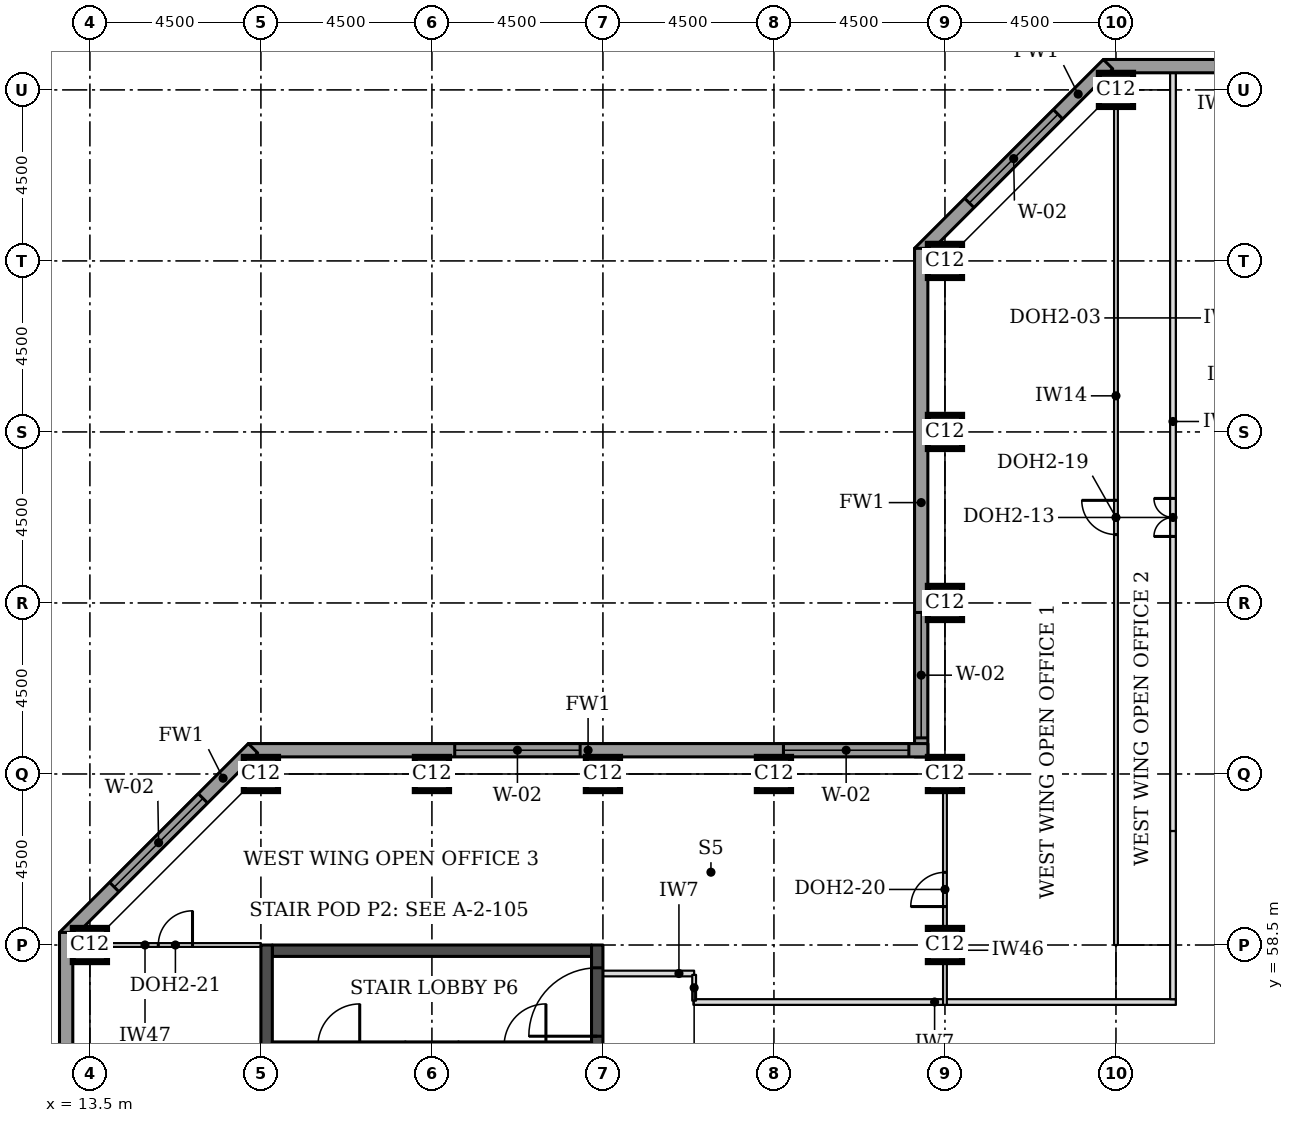
"""IFC4 building model, lengths in metres.
Left out: names, types, materials, properties, quantities, classifications, styles, units other than length and angle.
Written with IfcOpenShell. Run it as: python <this file> out.ifc"""

import sys

from ifc_helpers import new_model, si_unit, direction, frame, frame_2d, origin, origin_2d, place, context, subcontext, project, spatial, rectangle, extrude, element, fill, save


model = new_model("IFC4")
c1 = context("Model", 3, precision=1e-05, world=origin(), true_north=direction((0.0, 1.0)))
c2 = subcontext(c1, "Body", "Model", "MODEL_VIEW")
j1 = project(units=[si_unit("LENGTHUNIT", "METRE"), si_unit("PLANEANGLEUNIT", "RADIAN")], contexts=[c1])
p1 = place(None, origin())
s1 = spatial("IfcSite", under=j1, at=p1, CompositionType="ELEMENT")
p2 = place(p1, origin())
s2 = spatial("IfcBuilding", under=s1, at=p2, CompositionType="ELEMENT")
p3 = place(p2, frame((0.0, 0.0, 158.8)))
s3 = spatial("IfcBuildingStorey", under=s2, at=p3, CompositionType="ELEMENT", Elevation=158.8)
for number, where, z_axis, x_axis in (
    (1, (13.5, 58.5, 0.0), (0.0, 0.0, 1.0), (1.0, 0.0, 0.0)),
    (2, (36.0, 58.5, 0.0), (0.0, 0.0, 1.0), (1.0, 0.0, 0.0)),
    (3, (18.0, 63.0, 0.0), (0.0, 0.0, 1.0), (1.0, 0.0, 0.0)),
    (4, (22.5, 63.0, 0.0), (0.0, 0.0, 1.0), (1.0, 0.0, 0.0)),
    (5, (27.0, 63.0, 0.0), (0.0, 0.0, 1.0), (1.0, 0.0, 0.0)),
    (6, (31.5, 63.0, 0.0), (0.0, 0.0, 1.0), (1.0, 0.0, 0.0)),
    (7, (36.0, 63.0, 0.0), (0.0, 0.0, 1.0), (1.0, 0.0, 0.0)),
    (8, (36.0, 67.5, 0.0), (0.0, 0.0, 1.0), (1.0, 0.0, 0.0)),
    (9, (36.0, 72.0, 0.0), (0.0, 0.0, 1.0), (1.0, 0.0, 0.0)),
    (10, (36.0, 76.5, 0.0), (0.0, 0.0, 1.0), (1.0, 0.0, 0.0)),
    (11, (40.5, 81.0, 0.0), (0.0, 0.0, 1.0), (1.0, 0.0, 0.0)),
):
    element("IfcColumn", number, at=place(p3, frame(where, z_axis=z_axis, x_axis=x_axis)), inside=s3, PredefinedType="COLUMN", context=c2, shape_type="SweptSolid", body=[
        extrude(rectangle(XDim=0.9, YDim=0.9, at=origin_2d()), origin(), (0.0, 0.0, 1.0), 3.7),
    ])
p4 = place(p3, frame((18.3, 58.35, 0.0), z_axis=(0.0, 0.0, 1.0), x_axis=(1.0, 0.0, 0.0)))
e12 = element("IfcWall", 12, at=p4, inside=s3, PredefinedType="SHEAR", context=c2, shape_type="SweptSolid", body=[
    extrude(rectangle(XDim=8.4, YDim=0.3, at=frame_2d((4.2, 0.0))), origin(), (0.0, 0.0, 1.0), 3.7),
])
p5 = place(p3, frame((18.15, 49.5, 0.0), z_axis=(0.0, 0.0, 1.0), x_axis=(0.0, 1.0, 0.0)))
e13 = element("IfcWall", 13, at=p5, inside=s3, PredefinedType="SHEAR", context=c2, shape_type="SweptSolid", body=[
    extrude(rectangle(XDim=9.0, YDim=0.3, at=frame_2d((4.5, 0.0))), origin(), (0.0, 0.0, 1.0), 3.7),
])
p6 = place(p3, frame((26.85, 49.5, 0.0), z_axis=(0.0, 0.0, 1.0), x_axis=(0.0, 1.0, 0.0)))
e14 = element("IfcWall", 14, at=p6, inside=s3, PredefinedType="SHEAR", context=c2, shape_type="SweptSolid", body=[
    extrude(rectangle(XDim=9.0, YDim=0.3, at=frame_2d((4.5, 0.0))), origin(), (0.0, 0.0, 1.0), 3.7),
])
p7 = place(p6, frame((6.6, 0.0, 0.0)))
e15 = element("IfcOpeningElement", 15, at=p7, cuts=e14, PredefinedType="OPENING", context=c2, shape_type="SweptSolid", body=[
    extrude(rectangle(XDim=1.8, YDim=2.1, at=frame_2d((0.9, 1.05))), frame((0.0, 0.16, 0.0), z_axis=(0.0, -1.0, 0.0), x_axis=(1.0, 0.0, 0.0)), (0.0, 0.0, 1.0), 0.32),
])
p8 = place(p3, frame((72.331, 81.625, 0.0), z_axis=(0.0, 0.0, 1.0), x_axis=(-1.0, 0.0, 0.0)))
e16 = element("IfcWall", 16, at=p8, inside=s3, PredefinedType="STANDARD", context=c2, shape_type="SweptSolid", body=[
    extrude(rectangle(XDim=32.163, YDim=0.35, at=frame_2d((16.081, 0.0))), origin(), (0.0, 0.0, 1.0), 3.525),
])
p9 = place(p8, frame((5.431, 0.0, 0.9)))
e17 = element("IfcOpeningElement", 17, at=p9, cuts=e16, PredefinedType="OPENING", context=c2, shape_type="SweptSolid", body=[
    extrude(rectangle(XDim=3.3, YDim=1.9, at=frame_2d((1.65, 0.95))), frame((0.0, 0.185, 0.0), z_axis=(0.0, -1.0, 0.0), x_axis=(1.0, 0.0, 0.0)), (0.0, 0.0, 1.0), 0.37),
])
p10 = place(p8, frame((9.931, 0.0, 0.9)))
e18 = element("IfcOpeningElement", 18, at=p10, cuts=e16, PredefinedType="OPENING", context=c2, shape_type="SweptSolid", body=[
    extrude(rectangle(XDim=3.3, YDim=1.9, at=frame_2d((1.65, 0.95))), frame((0.0, 0.185, 0.0), z_axis=(0.0, -1.0, 0.0), x_axis=(1.0, 0.0, 0.0)), (0.0, 0.0, 1.0), 0.37),
])
p11 = place(p8, frame((14.431, 0.0, 0.9)))
e19 = element("IfcOpeningElement", 19, at=p11, cuts=e16, PredefinedType="OPENING", context=c2, shape_type="SweptSolid", body=[
    extrude(rectangle(XDim=3.3, YDim=1.9, at=frame_2d((1.65, 0.95))), frame((0.0, 0.185, 0.0), z_axis=(0.0, -1.0, 0.0), x_axis=(1.0, 0.0, 0.0)), (0.0, 0.0, 1.0), 0.37),
])
p12 = place(p8, frame((18.931, 0.0, 0.9)))
e20 = element("IfcOpeningElement", 20, at=p12, cuts=e16, PredefinedType="OPENING", context=c2, shape_type="SweptSolid", body=[
    extrude(rectangle(XDim=3.3, YDim=1.9, at=frame_2d((1.65, 0.95))), frame((0.0, 0.185, 0.0), z_axis=(0.0, -1.0, 0.0), x_axis=(1.0, 0.0, 0.0)), (0.0, 0.0, 1.0), 0.37),
])
p13 = place(p8, frame((23.431, 0.0, 0.9)))
e21 = element("IfcOpeningElement", 21, at=p13, cuts=e16, PredefinedType="OPENING", context=c2, shape_type="SweptSolid", body=[
    extrude(rectangle(XDim=3.3, YDim=1.9, at=frame_2d((1.65, 0.95))), frame((0.0, 0.185, 0.0), z_axis=(0.0, -1.0, 0.0), x_axis=(1.0, 0.0, 0.0)), (0.0, 0.0, 1.0), 0.37),
])
p14 = place(p3, frame((40.292, 81.676, 0.0), z_axis=(0.0, 0.0, 1.0), x_axis=(-0.707106781187, -0.707106781187, 0.0)))
e22 = element("IfcWall", 22, at=p14, inside=s3, PredefinedType="STANDARD", context=c2, shape_type="SweptSolid", body=[
    extrude(rectangle(XDim=7.027, YDim=0.35, at=frame_2d((3.513, 0.0))), origin(), (0.0, 0.0, 1.0), 3.525),
])
p15 = place(p14, frame((1.863, 0.0, 0.9)))
e23 = element("IfcOpeningElement", 23, at=p15, cuts=e22, PredefinedType="OPENING", context=c2, shape_type="SweptSolid", body=[
    extrude(rectangle(XDim=3.3, YDim=1.9, at=frame_2d((1.65, 0.95))), frame((0.0, 0.185, 0.0), z_axis=(0.0, -1.0, 0.0), x_axis=(1.0, 0.0, 0.0)), (0.0, 0.0, 1.0), 0.37),
])
p16 = place(p3, frame((35.375, 76.831, 0.0), z_axis=(0.0, 0.0, 1.0), x_axis=(0.0, -1.0, 0.0)))
e24 = element("IfcWall", 24, at=p16, inside=s3, PredefinedType="STANDARD", context=c2, shape_type="SweptSolid", body=[
    extrude(rectangle(XDim=13.381, YDim=0.35, at=frame_2d((6.691, 0.0))), origin(), (0.0, 0.0, 1.0), 3.525),
])
p17 = place(p16, frame((9.581, 0.0, 0.9)))
e25 = element("IfcOpeningElement", 25, at=p17, cuts=e24, PredefinedType="OPENING", context=c2, shape_type="SweptSolid", body=[
    extrude(rectangle(XDim=3.3, YDim=1.9, at=frame_2d((1.65, 0.95))), frame((0.0, 0.185, 0.0), z_axis=(0.0, -1.0, 0.0), x_axis=(1.0, 0.0, 0.0)), (0.0, 0.0, 1.0), 0.37),
])
p18 = place(p3, frame((35.55, 63.625, 0.0), z_axis=(0.0, 0.0, 1.0), x_axis=(-1.0, 0.0, 0.0)))
e26 = element("IfcWall", 26, at=p18, inside=s3, PredefinedType="STANDARD", context=c2, shape_type="SweptSolid", body=[
    extrude(rectangle(XDim=17.881, YDim=0.35, at=frame_2d((8.941, 0.0))), origin(), (0.0, 0.0, 1.0), 3.525),
])
p19 = place(p18, frame((0.5, 0.0, 0.9)))
e27 = element("IfcOpeningElement", 27, at=p19, cuts=e26, PredefinedType="OPENING", context=c2, shape_type="SweptSolid", body=[
    extrude(rectangle(XDim=3.3, YDim=1.9, at=frame_2d((1.65, 0.95))), frame((0.0, 0.185, 0.0), z_axis=(0.0, -1.0, 0.0), x_axis=(1.0, 0.0, 0.0)), (0.0, 0.0, 1.0), 0.37),
])
p20 = place(p18, frame((9.15, 0.0, 0.9)))
e28 = element("IfcOpeningElement", 28, at=p20, cuts=e26, PredefinedType="OPENING", context=c2, shape_type="SweptSolid", body=[
    extrude(rectangle(XDim=3.3, YDim=1.9, at=frame_2d((1.65, 0.95))), frame((0.0, 0.185, 0.0), z_axis=(0.0, -1.0, 0.0), x_axis=(1.0, 0.0, 0.0)), (0.0, 0.0, 1.0), 0.37),
])
p21 = place(p3, frame((17.792, 63.676, 0.0), z_axis=(0.0, 0.0, 1.0), x_axis=(-0.707106781187, -0.707106781187, 0.0)))
e29 = element("IfcWall", 29, at=p21, inside=s3, PredefinedType="STANDARD", context=c2, shape_type="SweptSolid", body=[
    extrude(rectangle(XDim=7.027, YDim=0.35, at=frame_2d((3.513, 0.0))), origin(), (0.0, 0.0, 1.0), 3.525),
])
p22 = place(p21, frame((1.863, 0.0, 0.9)))
e30 = element("IfcOpeningElement", 30, at=p22, cuts=e29, PredefinedType="OPENING", context=c2, shape_type="SweptSolid", body=[
    extrude(rectangle(XDim=3.3, YDim=1.9, at=frame_2d((1.65, 0.95))), frame((0.0, 0.185, 0.0), z_axis=(0.0, -1.0, 0.0), x_axis=(1.0, 0.0, 0.0)), (0.0, 0.0, 1.0), 0.37),
])
p23 = place(p3, frame((12.875, 58.831, 0.0), z_axis=(0.0, 0.0, 1.0), x_axis=(0.0, -1.0, 0.0)))
e31 = element("IfcWall", 31, at=p23, inside=s3, PredefinedType="STANDARD", context=c2, shape_type="SweptSolid", body=[
    extrude(rectangle(XDim=14.163, YDim=0.35, at=frame_2d((7.081, 0.0))), origin(), (0.0, 0.0, 1.0), 3.525),
])
p24 = place(p23, frame((5.431, 0.0, 0.9)))
e32 = element("IfcOpeningElement", 32, at=p24, cuts=e31, PredefinedType="OPENING", context=c2, shape_type="SweptSolid", body=[
    extrude(rectangle(XDim=3.3, YDim=1.9, at=frame_2d((1.65, 0.95))), frame((0.0, 0.185, 0.0), z_axis=(0.0, -1.0, 0.0), x_axis=(1.0, 0.0, 0.0)), (0.0, 0.0, 1.0), 0.37),
])
p25 = place(p3, frame((29.38, 57.0, 0.0), z_axis=(0.0, 0.0, 1.0), x_axis=(1.0, 0.0, 0.0)))
e33 = element("IfcWall", 33, at=p25, inside=s3, PredefinedType="PARTITIONING", context=c2, shape_type="SweptSolid", body=[
    extrude(rectangle(XDim=12.695, YDim=0.15, at=frame_2d((6.348, 0.0))), origin(), (0.0, 0.0, 1.0), 3.55),
])
p26 = place(p3, frame((42.0, 57.075, 0.0), z_axis=(0.0, 0.0, 1.0), x_axis=(0.0, 1.0, 0.0)))
e34 = element("IfcWall", 34, at=p26, inside=s3, PredefinedType="PARTITIONING", context=c2, shape_type="SweptSolid", body=[
    extrude(rectangle(XDim=4.425, YDim=0.15, at=frame_2d((2.212, 0.0))), origin(), (0.0, 0.0, 1.0), 3.55),
])
p27 = place(p3, frame((42.0, 61.5, 0.0), z_axis=(0.0, 0.0, 1.0), x_axis=(0.0, 1.0, 0.0)))
e35 = element("IfcWall", 35, at=p27, inside=s3, PredefinedType="PARTITIONING", context=c2, shape_type="SweptSolid", body=[
    extrude(rectangle(XDim=19.95, YDim=0.15, at=frame_2d((9.975, 0.0))), origin(), (0.0, 0.0, 1.0), 3.55),
])
p28 = place(p27, frame((7.75, 0.0, 0.0)))
e36 = element("IfcOpeningElement", 36, at=p28, cuts=e35, PredefinedType="OPENING", context=c2, shape_type="SweptSolid", body=[
    extrude(rectangle(XDim=1.0, YDim=2.1, at=frame_2d((0.5, 1.05))), frame((0.0, 0.085, 0.0), z_axis=(0.0, -1.0, 0.0), x_axis=(1.0, 0.0, 0.0)), (0.0, 0.0, 1.0), 0.17),
])
p29 = place(p3, frame((40.5, 81.0, 0.0), z_axis=(0.0, 0.0, 1.0), x_axis=(0.0, -1.0, 0.0)))
e37 = element("IfcWall", 37, at=p29, inside=s3, PredefinedType="PARTITIONING", context=c2, shape_type="SweptSolid", body=[
    extrude(rectangle(XDim=22.5, YDim=0.1, at=frame_2d((11.25, 0.0))), origin(), (0.0, 0.0, 1.0), 3.55),
])
p30 = place(p29, frame((10.8, 0.0, 0.0)))
e38 = element("IfcOpeningElement", 38, at=p30, cuts=e37, PredefinedType="OPENING", context=c2, shape_type="SweptSolid", body=[
    extrude(rectangle(XDim=0.9, YDim=2.1, at=frame_2d((0.45, 1.05))), frame((0.0, 0.06, 0.0), z_axis=(0.0, -1.0, 0.0), x_axis=(1.0, 0.0, 0.0)), (0.0, 0.0, 1.0), 0.12),
])
p31 = place(p3, frame((36.0, 63.0, 0.0), z_axis=(0.0, 0.0, 1.0), x_axis=(0.0, -1.0, 0.0)))
e39 = element("IfcWall", 39, at=p31, inside=s3, PredefinedType="PARTITIONING", context=c2, shape_type="SweptSolid", body=[
    extrude(rectangle(XDim=6.075, YDim=0.1, at=frame_2d((3.038, 0.0))), origin(), (0.0, 0.0, 1.0), 2.8),
])
p32 = place(p31, frame((2.588, 0.0, 0.0)))
e40 = element("IfcOpeningElement", 40, at=p32, cuts=e39, PredefinedType="OPENING", context=c2, shape_type="SweptSolid", body=[
    extrude(rectangle(XDim=0.9, YDim=2.1, at=frame_2d((0.45, 1.05))), frame((0.0, 0.06, 0.0), z_axis=(0.0, -1.0, 0.0), x_axis=(1.0, 0.0, 0.0)), (0.0, 0.0, 1.0), 0.12),
])
p33 = place(p3, frame((13.5, 58.5, 0.0), z_axis=(0.0, 0.0, 1.0), x_axis=(1.0, 0.0, 0.0)))
e41 = element("IfcWall", 41, at=p33, inside=s3, PredefinedType="PARTITIONING", context=c2, shape_type="SweptSolid", body=[
    extrude(rectangle(XDim=4.5, YDim=0.1, at=frame_2d((2.25, 0.0))), origin(), (0.0, 0.0, 1.0), 2.55),
])
p34 = place(p33, frame((1.8, 0.0, 0.0)))
e42 = element("IfcOpeningElement", 42, at=p34, cuts=e41, PredefinedType="OPENING", context=c2, shape_type="SweptSolid", body=[
    extrude(rectangle(XDim=0.9, YDim=2.1, at=frame_2d((0.45, 1.05))), frame((0.0, 0.06, 0.0), z_axis=(0.0, -1.0, 0.0), x_axis=(1.0, 0.0, 0.0)), (0.0, 0.0, 1.0), 0.12),
])
p35 = place(p3, frame((27.0, 57.75, 0.0), z_axis=(0.0, 0.0, 1.0), x_axis=(1.0, 0.0, 0.0)))
e43 = element("IfcWall", 43, at=p35, inside=s3, PredefinedType="PARTITIONING", context=c2, shape_type="SweptSolid", body=[
    extrude(rectangle(XDim=2.4, YDim=0.15, at=frame_2d((1.2, 0.0))), origin(), (0.0, 0.0, 1.0), 3.55),
])
p36 = place(p3, frame((29.4, 57.715, 0.0), z_axis=(0.0, 0.0, 1.0), x_axis=(0.0, -1.0, 0.0)))
e44 = element("IfcWall", 44, at=p36, inside=s3, PredefinedType="PARTITIONING", context=c2, shape_type="SweptSolid", body=[
    extrude(rectangle(XDim=0.68, YDim=0.1, at=frame_2d((0.34, 0.0))), origin(), (0.0, 0.0, 1.0), 3.55),
])
p37 = place(p3, frame((21.8, 55.85, 0.0), z_axis=(0.0, 0.0, 1.0), x_axis=(1.0, 0.0, 0.0)))
e45 = element("IfcWall", 45, at=p37, inside=s3, PredefinedType="SOLIDWALL", context=c2, shape_type="SweptSolid", body=[
    extrude(rectangle(XDim=1.4, YDim=0.2, at=frame_2d((0.7, 0.0))), origin(), (0.0, 0.0, 1.0), 3.55),
])
p38 = place(p3, frame((18.3, 55.85, 0.0), z_axis=(0.0, 0.0, 1.0), x_axis=(1.0, 0.0, 0.0)))
e46 = element("IfcWall", 46, at=p38, inside=s3, PredefinedType="SOLIDWALL", context=c2, shape_type="SweptSolid", body=[
    extrude(rectangle(XDim=3.5, YDim=0.2, at=frame_2d((1.75, 0.0))), origin(), (0.0, 0.0, 1.0), 3.55),
])
p39 = place(p38, frame((1.2, 0.0, 0.0)))
e47 = element("IfcOpeningElement", 47, at=p39, cuts=e46, PredefinedType="OPENING", context=c2, shape_type="SweptSolid", body=[
    extrude(rectangle(XDim=1.1, YDim=2.1, at=frame_2d((0.55, 1.05))), frame((0.0, 0.11, 0.0), z_axis=(0.0, -1.0, 0.0), x_axis=(1.0, 0.0, 0.0)), (0.0, 0.0, 1.0), 0.22),
])
p40 = place(p3, frame((23.2, 55.85, 0.0), z_axis=(0.0, 0.0, 1.0), x_axis=(1.0, 0.0, 0.0)))
e48 = element("IfcWall", 48, at=p40, inside=s3, PredefinedType="SOLIDWALL", context=c2, shape_type="SweptSolid", body=[
    extrude(rectangle(XDim=3.5, YDim=0.2, at=frame_2d((1.75, 0.0))), origin(), (0.0, 0.0, 1.0), 3.55),
])
p41 = place(p40, frame((1.2, 0.0, 0.0)))
e49 = element("IfcOpeningElement", 49, at=p41, cuts=e48, PredefinedType="OPENING", context=c2, shape_type="SweptSolid", body=[
    extrude(rectangle(XDim=1.1, YDim=2.1, at=frame_2d((0.55, 1.05))), frame((0.0, 0.11, 0.0), z_axis=(0.0, -1.0, 0.0), x_axis=(1.0, 0.0, 0.0)), (0.0, 0.0, 1.0), 0.22),
])
p42 = place(p15, origin())
e50 = element("IfcWindow", 50, at=p42, inside=s3, PartitioningType="SINGLE_PANEL", PredefinedType="WINDOW", context=c2, shape_type="SweptSolid", body=[
    extrude(rectangle(XDim=3.3, YDim=1.9, at=frame_2d((1.65, 0.95))), frame((0.0, 0.085, 0.0), z_axis=(0.0, -1.0, 0.0), x_axis=(1.0, 0.0, 0.0)), (0.0, 0.0, 1.0), 0.06),
])
fill(e23, e50)
p43 = place(p17, origin())
e51 = element("IfcWindow", 51, at=p43, inside=s3, PartitioningType="SINGLE_PANEL", PredefinedType="WINDOW", context=c2, shape_type="SweptSolid", body=[
    extrude(rectangle(XDim=3.3, YDim=1.9, at=frame_2d((1.65, 0.95))), frame((0.0, 0.085, 0.0), z_axis=(0.0, -1.0, 0.0), x_axis=(1.0, 0.0, 0.0)), (0.0, 0.0, 1.0), 0.06),
])
fill(e25, e51)
p44 = place(p19, origin())
e52 = element("IfcWindow", 52, at=p44, inside=s3, PartitioningType="SINGLE_PANEL", PredefinedType="WINDOW", context=c2, shape_type="SweptSolid", body=[
    extrude(rectangle(XDim=3.3, YDim=1.9, at=frame_2d((1.65, 0.95))), frame((0.0, 0.085, 0.0), z_axis=(0.0, -1.0, 0.0), x_axis=(1.0, 0.0, 0.0)), (0.0, 0.0, 1.0), 0.06),
])
fill(e27, e52)
p45 = place(p20, origin())
e53 = element("IfcWindow", 53, at=p45, inside=s3, PartitioningType="SINGLE_PANEL", PredefinedType="WINDOW", context=c2, shape_type="SweptSolid", body=[
    extrude(rectangle(XDim=3.3, YDim=1.9, at=frame_2d((1.65, 0.95))), frame((0.0, 0.085, 0.0), z_axis=(0.0, -1.0, 0.0), x_axis=(1.0, 0.0, 0.0)), (0.0, 0.0, 1.0), 0.06),
])
fill(e28, e53)
p46 = place(p22, origin())
e54 = element("IfcWindow", 54, at=p46, inside=s3, PartitioningType="SINGLE_PANEL", PredefinedType="WINDOW", context=c2, shape_type="SweptSolid", body=[
    extrude(rectangle(XDim=3.3, YDim=1.9, at=frame_2d((1.65, 0.95))), frame((0.0, 0.085, 0.0), z_axis=(0.0, -1.0, 0.0), x_axis=(1.0, 0.0, 0.0)), (0.0, 0.0, 1.0), 0.06),
])
fill(e30, e54)
p47 = place(p28, origin())
e55 = element("IfcDoor", 55, at=p47, inside=s3, OperationType="DOUBLE_DOOR_SINGLE_SWING", PredefinedType="DOOR", context=c2, shape_type="SweptSolid", body=[
    extrude(rectangle(XDim=1.0, YDim=2.1, at=frame_2d((0.5, 1.05))), frame((0.0, 0.025, 0.0), z_axis=(0.0, -1.0, 0.0), x_axis=(1.0, 0.0, 0.0)), (0.0, 0.0, 1.0), 0.05),
])
fill(e36, e55)
p48 = place(p30, frame((0.9, 0.0, 0.0), z_axis=(0.0, 0.0, 1.0), x_axis=(-1.0, 0.0, 0.0)))
e56 = element("IfcDoor", 56, at=p48, inside=s3, OperationType="SINGLE_SWING_RIGHT", PredefinedType="DOOR", context=c2, shape_type="SweptSolid", body=[
    extrude(rectangle(XDim=0.9, YDim=2.1, at=frame_2d((0.45, 1.05))), frame((0.0, 0.025, 0.0), z_axis=(0.0, -1.0, 0.0), x_axis=(1.0, 0.0, 0.0)), (0.0, 0.0, 1.0), 0.05),
])
fill(e38, e56)
p49 = place(p32, frame((0.9, 0.0, 0.0), z_axis=(0.0, 0.0, 1.0), x_axis=(-1.0, 0.0, 0.0)))
e57 = element("IfcDoor", 57, at=p49, inside=s3, OperationType="SINGLE_SWING_LEFT", PredefinedType="DOOR", context=c2, shape_type="SweptSolid", body=[
    extrude(rectangle(XDim=0.9, YDim=2.1, at=frame_2d((0.45, 1.05))), frame((0.0, 0.025, 0.0), z_axis=(0.0, -1.0, 0.0), x_axis=(1.0, 0.0, 0.0)), (0.0, 0.0, 1.0), 0.05),
])
fill(e40, e57)
p50 = place(p34, origin())
e58 = element("IfcDoor", 58, at=p50, inside=s3, OperationType="SINGLE_SWING_RIGHT", PredefinedType="DOOR", context=c2, shape_type="SweptSolid", body=[
    extrude(rectangle(XDim=0.9, YDim=2.1, at=frame_2d((0.45, 1.05))), frame((0.0, 0.025, 0.0), z_axis=(0.0, -1.0, 0.0), x_axis=(1.0, 0.0, 0.0)), (0.0, 0.0, 1.0), 0.05),
])
fill(e42, e58)
p51 = place(p7, origin())
e59 = element("IfcDoor", 59, at=p51, inside=s3, OperationType="SINGLE_SWING_LEFT", PredefinedType="DOOR", context=c2, shape_type="SweptSolid", body=[
    extrude(rectangle(XDim=1.8, YDim=2.1, at=frame_2d((0.9, 1.05))), frame((0.0, 0.025, 0.0), z_axis=(0.0, -1.0, 0.0), x_axis=(1.0, 0.0, 0.0)), (0.0, 0.0, 1.0), 0.05),
])
fill(e15, e59)
save(model, sys.argv[1])
